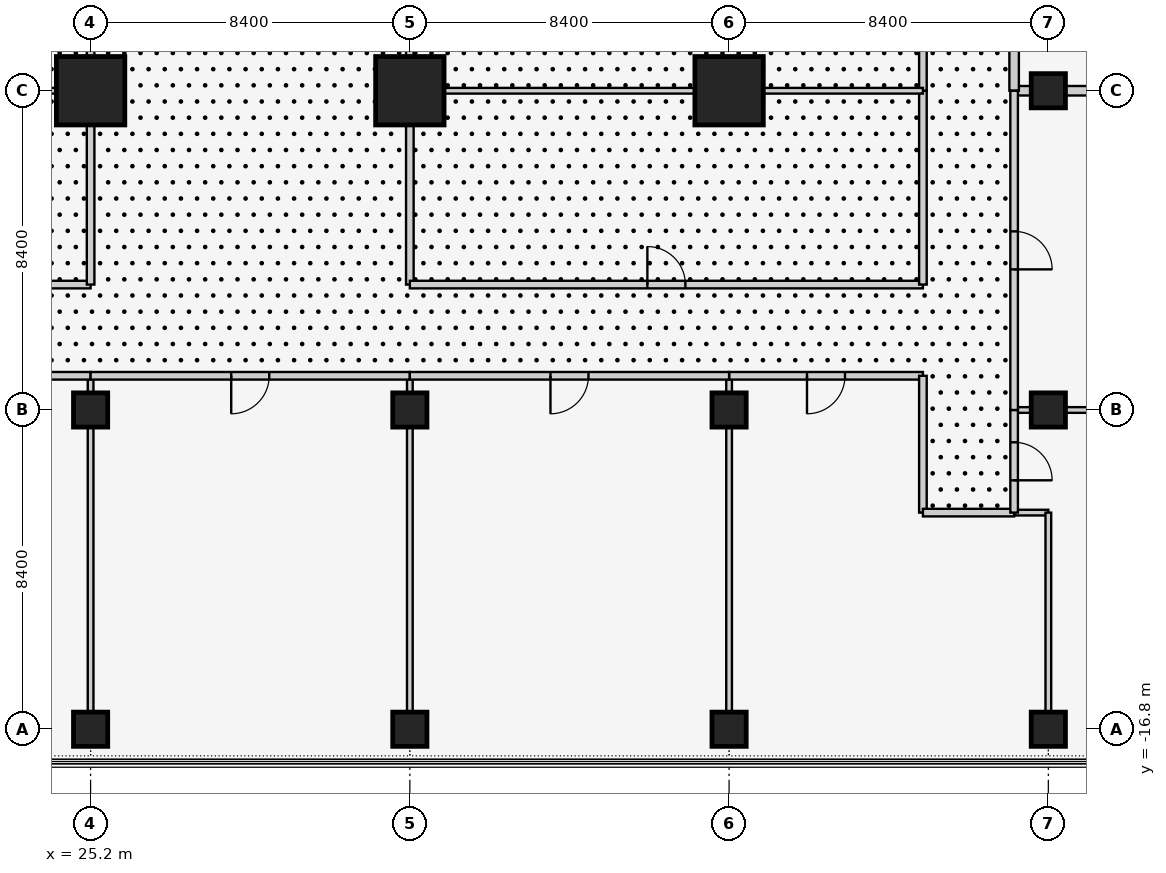
"""IFC4 building model, lengths in metres.
Left out: names, types, materials, properties, quantities, classifications, styles, units other than length and angle.
Written with IfcOpenShell. Run it as: python <this file> out.ifc"""

import sys

from ifc_helpers import new_model, si_unit, direction, frame, frame_2d, origin, origin_2d, place, context, subcontext, project, spatial, rectangle, extrude, element, fill, save


model = new_model("IFC4")
c1 = context("Model", 3, precision=1e-05, world=origin(), true_north=direction((0.0, 1.0)))
c2 = subcontext(c1, "Body", "Model", "MODEL_VIEW")
j1 = project(units=[si_unit("LENGTHUNIT", "METRE"), si_unit("PLANEANGLEUNIT", "RADIAN")], contexts=[c1])
p1 = place(None, origin())
s1 = spatial("IfcSite", under=j1, at=p1, CompositionType="ELEMENT")
p2 = place(p1, origin())
s2 = spatial("IfcBuilding", under=s1, at=p2, CompositionType="ELEMENT")
p3 = place(p2, frame((0.0, 0.0, 6.0)))
s3 = spatial("IfcBuildingStorey", under=s2, at=p3, CompositionType="ELEMENT", Elevation=6.0)
for number, where, z_axis, x_axis in (
    (1, (25.2, -16.8, 0.0), (0.0, 0.0, 1.0), (1.0, 0.0, 0.0)),
    (2, (25.2, -8.4, 0.0), (0.0, 0.0, 1.0), (1.0, 0.0, 0.0)),
):
    element("IfcColumn", number, at=place(p3, frame(where, z_axis=z_axis, x_axis=x_axis)), inside=s3, PredefinedType="COLUMN", context=c2, shape_type="SweptSolid", body=[
        extrude(rectangle(XDim=0.9, YDim=0.9, at=origin_2d()), origin(), (0.0, 0.0, 1.0), 4.5),
    ])
p4 = place(p3, frame((25.2, 0.0, 0.0), z_axis=(0.0, 0.0, 1.0), x_axis=(1.0, 0.0, 0.0)))
e3 = element("IfcColumn", 3, at=p4, inside=s3, PredefinedType="COLUMN", context=c2, shape_type="SweptSolid", body=[
    extrude(rectangle(XDim=1.8, YDim=1.8, at=origin_2d()), origin(), (0.0, 0.0, 1.0), 4.5),
])
for number, where, z_axis, x_axis in (
    (4, (33.6, -16.8, 0.0), (0.0, 0.0, 1.0), (1.0, 0.0, 0.0)),
    (5, (33.6, -8.4, 0.0), (0.0, 0.0, 1.0), (1.0, 0.0, 0.0)),
):
    element("IfcColumn", number, at=place(p3, frame(where, z_axis=z_axis, x_axis=x_axis)), inside=s3, PredefinedType="COLUMN", context=c2, shape_type="SweptSolid", body=[
        extrude(rectangle(XDim=0.9, YDim=0.9, at=origin_2d()), origin(), (0.0, 0.0, 1.0), 4.5),
    ])
p5 = place(p3, frame((33.6, 0.0, 0.0), z_axis=(0.0, 0.0, 1.0), x_axis=(1.0, 0.0, 0.0)))
e6 = element("IfcColumn", 6, at=p5, inside=s3, PredefinedType="COLUMN", context=c2, shape_type="SweptSolid", body=[
    extrude(rectangle(XDim=1.8, YDim=1.8, at=origin_2d()), origin(), (0.0, 0.0, 1.0), 4.5),
])
for number, where, z_axis, x_axis in (
    (7, (42.0, -16.8, 0.0), (0.0, 0.0, 1.0), (1.0, 0.0, 0.0)),
    (8, (42.0, -8.4, 0.0), (0.0, 0.0, 1.0), (1.0, 0.0, 0.0)),
):
    element("IfcColumn", number, at=place(p3, frame(where, z_axis=z_axis, x_axis=x_axis)), inside=s3, PredefinedType="COLUMN", context=c2, shape_type="SweptSolid", body=[
        extrude(rectangle(XDim=0.9, YDim=0.9, at=origin_2d()), origin(), (0.0, 0.0, 1.0), 4.5),
    ])
p6 = place(p3, frame((42.0, 0.0, 0.0), z_axis=(0.0, 0.0, 1.0), x_axis=(1.0, 0.0, 0.0)))
e9 = element("IfcColumn", 9, at=p6, inside=s3, PredefinedType="COLUMN", context=c2, shape_type="SweptSolid", body=[
    extrude(rectangle(XDim=1.8, YDim=1.8, at=origin_2d()), origin(), (0.0, 0.0, 1.0), 4.5),
])
for number, where, z_axis, x_axis in (
    (10, (50.4, -16.8, 0.0), (0.0, 0.0, 1.0), (1.0, 0.0, 0.0)),
    (11, (50.4, -8.4, 0.0), (0.0, 0.0, 1.0), (1.0, 0.0, 0.0)),
    (12, (50.4, 0.0, 0.0), (0.0, 0.0, 1.0), (1.0, 0.0, 0.0)),
):
    element("IfcColumn", number, at=place(p3, frame(where, z_axis=z_axis, x_axis=x_axis)), inside=s3, PredefinedType="COLUMN", context=c2, shape_type="SweptSolid", body=[
        extrude(rectangle(XDim=0.9, YDim=0.9, at=origin_2d()), origin(), (0.0, 0.0, 1.0), 4.5),
    ])
p7 = place(p3, frame((49.95, 0.0, 0.0), z_axis=(0.0, 0.0, 1.0), x_axis=(-1.0, 0.0, 0.0)))
e13 = element("IfcWall", 13, at=p7, inside=s3, PredefinedType="SOLIDWALL", context=c2, shape_type="SweptSolid", body=[
    extrude(rectangle(XDim=0.45, YDim=0.25, at=frame_2d((0.225, 0.0))), origin(), (0.0, 0.0, 1.0), 3.543),
])
p8 = place(p3, frame((58.35, 0.0, 0.0), z_axis=(0.0, 0.0, 1.0), x_axis=(-1.0, 0.0, 0.0)))
e14 = element("IfcWall", 14, at=p8, inside=s3, PredefinedType="SOLIDWALL", context=c2, shape_type="SweptSolid", body=[
    extrude(rectangle(XDim=7.5, YDim=0.25, at=frame_2d((3.75, 0.0))), origin(), (0.0, 0.0, 1.0), 3.543),
])
p9 = place(p3, frame((49.5, 0.0, 0.0), z_axis=(0.0, 0.0, 1.0), x_axis=(0.0, 1.0, 0.0)))
e15 = element("IfcWall", 15, at=p9, inside=s3, PredefinedType="SOLIDWALL", context=c2, shape_type="SweptSolid", body=[
    extrude(rectangle(XDim=8.4, YDim=0.25, at=frame_2d((4.2, 0.0))), origin(), (0.0, 0.0, 1.0), 4.3),
])
p10 = place(p9, frame((3.6, 0.0, 0.0)))
e16 = element("IfcOpeningElement", 16, at=p10, cuts=e15, PredefinedType="OPENING", context=c2, shape_type="SweptSolid", body=[
    extrude(rectangle(XDim=1.2, YDim=2.1, at=frame_2d((0.6, 1.05))), frame((0.0, 0.135, 0.0), z_axis=(0.0, -1.0, 0.0), x_axis=(1.0, 0.0, 0.0)), (0.0, 0.0, 1.0), 0.27),
])
p11 = place(p3, frame((49.5, -11.1, 0.0), z_axis=(0.0, 0.0, 1.0), x_axis=(1.0, 0.0, 0.0)))
e17 = element("IfcWall", 17, at=p11, inside=s3, PredefinedType="PARTITIONING", context=c2, shape_type="SweptSolid", body=[
    extrude(rectangle(XDim=0.9, YDim=0.15, at=frame_2d((0.45, 0.0))), origin(), (0.0, 0.0, 1.0), 4.3),
])
p12 = place(p3, frame((50.4, -11.1, 0.0), z_axis=(0.0, 0.0, 1.0), x_axis=(0.0, -1.0, 0.0)))
e18 = element("IfcWall", 18, at=p12, inside=s3, PredefinedType="PARTITIONING", context=c2, shape_type="SweptSolid", body=[
    extrude(rectangle(XDim=5.25, YDim=0.15, at=frame_2d((2.625, 0.0))), origin(), (0.0, 0.0, 1.0), 3.543),
])
p13 = place(p3, frame((42.0, -16.35, 0.0), z_axis=(0.0, 0.0, 1.0), x_axis=(0.0, 1.0, 0.0)))
e19 = element("IfcWall", 19, at=p13, inside=s3, PredefinedType="PARTITIONING", context=c2, shape_type="SweptSolid", body=[
    extrude(rectangle(XDim=7.5, YDim=0.15, at=frame_2d((3.75, 0.0))), origin(), (0.0, 0.0, 1.0), 3.543),
])
p14 = place(p3, frame((42.0, -7.95, 0.0), z_axis=(0.0, 0.0, 1.0), x_axis=(0.0, 1.0, 0.0)))
e20 = element("IfcWall", 20, at=p14, inside=s3, PredefinedType="PARTITIONING", context=c2, shape_type="SweptSolid", body=[
    extrude(rectangle(XDim=0.45, YDim=0.15, at=frame_2d((0.225, 0.0))), origin(), (0.0, 0.0, 1.0), 3.543),
])
p15 = place(p3, frame((42.0, -7.5, 0.0), z_axis=(0.0, 0.0, 1.0), x_axis=(1.0, 0.0, 0.0)))
e21 = element("IfcWall", 21, at=p15, inside=s3, PredefinedType="PARTITIONING", context=c2, shape_type="SweptSolid", body=[
    extrude(rectangle(XDim=5.1, YDim=0.2, at=frame_2d((2.55, 0.0))), origin(), (0.0, 0.0, 1.0), 4.3),
])
p16 = place(p15, frame((2.05, 0.0, 0.0)))
e22 = element("IfcOpeningElement", 22, at=p16, cuts=e21, PredefinedType="OPENING", context=c2, shape_type="SweptSolid", body=[
    extrude(rectangle(XDim=1.0, YDim=2.1, at=frame_2d((0.5, 1.05))), frame((0.0, 0.11, 0.0), z_axis=(0.0, -1.0, 0.0), x_axis=(1.0, 0.0, 0.0)), (0.0, 0.0, 1.0), 0.22),
])
p17 = place(p3, frame((47.1, -7.5, 0.0), z_axis=(0.0, 0.0, 1.0), x_axis=(0.0, -1.0, 0.0)))
e23 = element("IfcWall", 23, at=p17, inside=s3, PredefinedType="PARTITIONING", context=c2, shape_type="SweptSolid", body=[
    extrude(rectangle(XDim=3.6, YDim=0.2, at=frame_2d((1.8, 0.0))), origin(), (0.0, 0.0, 1.0), 4.3),
])
p18 = place(p3, frame((47.1, -11.1, 0.0), z_axis=(0.0, 0.0, 1.0), x_axis=(1.0, 0.0, 0.0)))
e24 = element("IfcWall", 24, at=p18, inside=s3, PredefinedType="PARTITIONING", context=c2, shape_type="SweptSolid", body=[
    extrude(rectangle(XDim=2.4, YDim=0.2, at=frame_2d((1.2, 0.0))), origin(), (0.0, 0.0, 1.0), 4.3),
])
p19 = place(p3, frame((49.5, -8.4, 0.0), z_axis=(0.0, 0.0, 1.0), x_axis=(1.0, 0.0, 0.0)))
e25 = element("IfcWall", 25, at=p19, inside=s3, PredefinedType="PARTITIONING", context=c2, shape_type="SweptSolid", body=[
    extrude(rectangle(XDim=0.45, YDim=0.15, at=frame_2d((0.225, 0.0))), origin(), (0.0, 0.0, 1.0), 3.543),
])
p20 = place(p3, frame((50.85, -8.4, 0.0), z_axis=(0.0, 0.0, 1.0), x_axis=(1.0, 0.0, 0.0)))
e26 = element("IfcWall", 26, at=p20, inside=s3, PredefinedType="PARTITIONING", context=c2, shape_type="SweptSolid", body=[
    extrude(rectangle(XDim=7.5, YDim=0.15, at=frame_2d((3.75, 0.0))), origin(), (0.0, 0.0, 1.0), 3.543),
])
p21 = place(p3, frame((49.5, -11.1, 0.0), z_axis=(0.0, 0.0, 1.0), x_axis=(0.0, 1.0, 0.0)))
e27 = element("IfcWall", 27, at=p21, inside=s3, PredefinedType="PARTITIONING", context=c2, shape_type="SweptSolid", body=[
    extrude(rectangle(XDim=2.7, YDim=0.2, at=frame_2d((1.35, 0.0))), origin(), (0.0, 0.0, 1.0), 4.3),
])
p22 = place(p21, frame((0.85, 0.0, 0.0)))
e28 = element("IfcOpeningElement", 28, at=p22, cuts=e27, PredefinedType="OPENING", context=c2, shape_type="SweptSolid", body=[
    extrude(rectangle(XDim=1.0, YDim=2.1, at=frame_2d((0.5, 1.05))), frame((0.0, 0.11, 0.0), z_axis=(0.0, -1.0, 0.0), x_axis=(1.0, 0.0, 0.0)), (0.0, 0.0, 1.0), 0.22),
])
p23 = place(p3, frame((25.2, -8.85, 0.0), z_axis=(0.0, 0.0, 1.0), x_axis=(0.0, -1.0, 0.0)))
e29 = element("IfcWall", 29, at=p23, inside=s3, PredefinedType="PARTITIONING", context=c2, shape_type="SweptSolid", body=[
    extrude(rectangle(XDim=7.5, YDim=0.15, at=frame_2d((3.75, 0.0))), origin(), (0.0, 0.0, 1.0), 3.543),
])
p24 = place(p3, frame((25.2, -7.5, 0.0), z_axis=(0.0, 0.0, 1.0), x_axis=(0.0, -1.0, 0.0)))
e30 = element("IfcWall", 30, at=p24, inside=s3, PredefinedType="PARTITIONING", context=c2, shape_type="SweptSolid", body=[
    extrude(rectangle(XDim=0.45, YDim=0.15, at=frame_2d((0.225, 0.0))), origin(), (0.0, 0.0, 1.0), 3.543),
])
p25 = place(p3, frame((16.8, -7.5, 0.0), z_axis=(0.0, 0.0, 1.0), x_axis=(1.0, 0.0, 0.0)))
e31 = element("IfcWall", 31, at=p25, inside=s3, PredefinedType="PARTITIONING", context=c2, shape_type="SweptSolid", body=[
    extrude(rectangle(XDim=8.4, YDim=0.2, at=frame_2d((4.2, 0.0))), origin(), (0.0, 0.0, 1.0), 4.3),
])
p26 = place(p25, frame((3.7, 0.0, 0.0)))
e32 = element("IfcOpeningElement", 32, at=p26, cuts=e31, PredefinedType="OPENING", context=c2, shape_type="SweptSolid", body=[
    extrude(rectangle(XDim=1.0, YDim=2.1, at=frame_2d((0.5, 1.05))), frame((0.0, 0.11, 0.0), z_axis=(0.0, -1.0, 0.0), x_axis=(1.0, 0.0, 0.0)), (0.0, 0.0, 1.0), 0.22),
])
p27 = place(p3, frame((33.6, -8.85, 0.0), z_axis=(0.0, 0.0, 1.0), x_axis=(0.0, -1.0, 0.0)))
e33 = element("IfcWall", 33, at=p27, inside=s3, PredefinedType="PARTITIONING", context=c2, shape_type="SweptSolid", body=[
    extrude(rectangle(XDim=7.5, YDim=0.15, at=frame_2d((3.75, 0.0))), origin(), (0.0, 0.0, 1.0), 3.543),
])
p28 = place(p3, frame((33.6, -7.5, 0.0), z_axis=(0.0, 0.0, 1.0), x_axis=(0.0, -1.0, 0.0)))
e34 = element("IfcWall", 34, at=p28, inside=s3, PredefinedType="PARTITIONING", context=c2, shape_type="SweptSolid", body=[
    extrude(rectangle(XDim=0.45, YDim=0.15, at=frame_2d((0.225, 0.0))), origin(), (0.0, 0.0, 1.0), 3.543),
])
p29 = place(p3, frame((25.2, -7.5, 0.0), z_axis=(0.0, 0.0, 1.0), x_axis=(1.0, 0.0, 0.0)))
e35 = element("IfcWall", 35, at=p29, inside=s3, PredefinedType="PARTITIONING", context=c2, shape_type="SweptSolid", body=[
    extrude(rectangle(XDim=8.4, YDim=0.2, at=frame_2d((4.2, 0.0))), origin(), (0.0, 0.0, 1.0), 4.3),
])
p30 = place(p29, frame((3.7, 0.0, 0.0)))
e36 = element("IfcOpeningElement", 36, at=p30, cuts=e35, PredefinedType="OPENING", context=c2, shape_type="SweptSolid", body=[
    extrude(rectangle(XDim=1.0, YDim=2.1, at=frame_2d((0.5, 1.05))), frame((0.0, 0.11, 0.0), z_axis=(0.0, -1.0, 0.0), x_axis=(1.0, 0.0, 0.0)), (0.0, 0.0, 1.0), 0.22),
])
p31 = place(p3, frame((33.6, -7.5, 0.0), z_axis=(0.0, 0.0, 1.0), x_axis=(1.0, 0.0, 0.0)))
e37 = element("IfcWall", 37, at=p31, inside=s3, PredefinedType="PARTITIONING", context=c2, shape_type="SweptSolid", body=[
    extrude(rectangle(XDim=8.4, YDim=0.2, at=frame_2d((4.2, 0.0))), origin(), (0.0, 0.0, 1.0), 4.3),
])
p32 = place(p31, frame((3.7, 0.0, 0.0)))
e38 = element("IfcOpeningElement", 38, at=p32, cuts=e37, PredefinedType="OPENING", context=c2, shape_type="SweptSolid", body=[
    extrude(rectangle(XDim=1.0, YDim=2.1, at=frame_2d((0.5, 1.05))), frame((0.0, 0.11, 0.0), z_axis=(0.0, -1.0, 0.0), x_axis=(1.0, 0.0, 0.0)), (0.0, 0.0, 1.0), 0.22),
])
p33 = place(p3, frame((49.5, -8.4, 0.0), z_axis=(0.0, 0.0, 1.0), x_axis=(0.0, 1.0, 0.0)))
e39 = element("IfcWall", 39, at=p33, inside=s3, PredefinedType="PARTITIONING", context=c2, shape_type="SweptSolid", body=[
    extrude(rectangle(XDim=8.4, YDim=0.2, at=frame_2d((4.2, 0.0))), origin(), (0.0, 0.0, 1.0), 4.3),
])
p34 = place(p33, frame((3.7, 0.0, 0.0)))
e40 = element("IfcOpeningElement", 40, at=p34, cuts=e39, PredefinedType="OPENING", context=c2, shape_type="SweptSolid", body=[
    extrude(rectangle(XDim=1.0, YDim=2.1, at=frame_2d((0.5, 1.05))), frame((0.0, 0.11, 0.0), z_axis=(0.0, -1.0, 0.0), x_axis=(1.0, 0.0, 0.0)), (0.0, 0.0, 1.0), 0.22),
])
p35 = place(p3, frame((11.7, -5.1, 0.0), z_axis=(0.0, 0.0, 1.0), x_axis=(1.0, 0.0, 0.0)))
e41 = element("IfcWall", 41, at=p35, inside=s3, PredefinedType="PARTITIONING", context=c2, shape_type="SweptSolid", body=[
    extrude(rectangle(XDim=13.5, YDim=0.2, at=frame_2d((6.75, 0.0))), origin(), (0.0, 0.0, 1.0), 4.3),
])
p36 = place(p35, frame((6.25, 0.0, 0.0)))
e42 = element("IfcOpeningElement", 42, at=p36, cuts=e41, PredefinedType="OPENING", context=c2, shape_type="SweptSolid", body=[
    extrude(rectangle(XDim=1.0, YDim=2.1, at=frame_2d((0.5, 1.05))), frame((0.0, 0.11, 0.0), z_axis=(0.0, -1.0, 0.0), x_axis=(1.0, 0.0, 0.0)), (0.0, 0.0, 1.0), 0.22),
])
for number, where, z_axis, x_axis in (
    (43, (25.2, -5.1, 0.0), (0.0, 0.0, 1.0), (0.0, 1.0, 0.0)),
    (44, (33.6, -0.9, 0.0), (0.0, 0.0, 1.0), (0.0, -1.0, 0.0)),
):
    element("IfcWall", number, at=place(p3, frame(where, z_axis=z_axis, x_axis=x_axis)), inside=s3, PredefinedType="PARTITIONING", context=c2, shape_type="SweptSolid", body=[
        extrude(rectangle(XDim=4.2, YDim=0.2, at=frame_2d((2.1, 0.0))), origin(), (0.0, 0.0, 1.0), 3.543),
    ])
p37 = place(p3, frame((33.6, -5.1, 0.0), z_axis=(0.0, 0.0, 1.0), x_axis=(1.0, 0.0, 0.0)))
e45 = element("IfcWall", 45, at=p37, inside=s3, PredefinedType="PARTITIONING", context=c2, shape_type="SweptSolid", body=[
    extrude(rectangle(XDim=13.5, YDim=0.2, at=frame_2d((6.75, 0.0))), origin(), (0.0, 0.0, 1.0), 4.3),
])
p38 = place(p37, frame((6.25, 0.0, 0.0)))
e46 = element("IfcOpeningElement", 46, at=p38, cuts=e45, PredefinedType="OPENING", context=c2, shape_type="SweptSolid", body=[
    extrude(rectangle(XDim=1.0, YDim=2.1, at=frame_2d((0.5, 1.05))), frame((0.0, 0.11, 0.0), z_axis=(0.0, -1.0, 0.0), x_axis=(1.0, 0.0, 0.0)), (0.0, 0.0, 1.0), 0.22),
])
p39 = place(p3, frame((47.1, -5.1, 0.0), z_axis=(0.0, 0.0, 1.0), x_axis=(0.0, 1.0, 0.0)))
e47 = element("IfcWall", 47, at=p39, inside=s3, PredefinedType="PARTITIONING", context=c2, shape_type="SweptSolid", body=[
    extrude(rectangle(XDim=5.1, YDim=0.2, at=frame_2d((2.55, 0.0))), origin(), (0.0, 0.0, 1.0), 4.3),
])
for number, where, z_axis, x_axis in (
    (48, (25.2, 0.9, 0.0), (0.0, 0.0, 1.0), (0.0, 1.0, 0.0)),
    (49, (33.6, 7.5, 0.0), (0.0, 0.0, 1.0), (0.0, -1.0, 0.0)),
):
    element("IfcWall", number, at=place(p3, frame(where, z_axis=z_axis, x_axis=x_axis)), inside=s3, PredefinedType="PARTITIONING", context=c2, shape_type="SweptSolid", body=[
        extrude(rectangle(XDim=6.6, YDim=0.2, at=frame_2d((3.3, 0.0))), origin(), (0.0, 0.0, 1.0), 3.543),
    ])
p40 = place(p3, frame((47.1, 0.0, 0.0), z_axis=(0.0, 0.0, 1.0), x_axis=(0.0, 1.0, 0.0)))
e50 = element("IfcWall", 50, at=p40, inside=s3, PredefinedType="PARTITIONING", context=c2, shape_type="SweptSolid", body=[
    extrude(rectangle(XDim=8.4, YDim=0.2, at=frame_2d((4.2, 0.0))), origin(), (0.0, 0.0, 1.0), 4.3),
])
p41 = place(p40, frame((3.7, 0.0, 0.0)))
e51 = element("IfcOpeningElement", 51, at=p41, cuts=e50, PredefinedType="OPENING", context=c2, shape_type="SweptSolid", body=[
    extrude(rectangle(XDim=1.0, YDim=2.1, at=frame_2d((0.5, 1.05))), frame((0.0, 0.11, 0.0), z_axis=(0.0, -1.0, 0.0), x_axis=(1.0, 0.0, 0.0)), (0.0, 0.0, 1.0), 0.22),
])
for number, where, z_axis, x_axis in (
    (52, (17.7, 0.0, 0.0), (0.0, 0.0, 1.0), (1.0, 0.0, 0.0)),
    (53, (34.5, 0.0, 0.0), (0.0, 0.0, 1.0), (1.0, 0.0, 0.0)),
):
    element("IfcWall", number, at=place(p3, frame(where, z_axis=z_axis, x_axis=x_axis)), inside=s3, PredefinedType="PARTITIONING", context=c2, shape_type="SweptSolid", body=[
        extrude(rectangle(XDim=6.6, YDim=0.15, at=frame_2d((3.3, 0.0))), origin(), (0.0, 0.0, 1.0), 3.543),
    ])
p42 = place(p3, frame((42.9, 0.0, 0.0), z_axis=(0.0, 0.0, 1.0), x_axis=(1.0, 0.0, 0.0)))
e54 = element("IfcWall", 54, at=p42, inside=s3, PredefinedType="PARTITIONING", context=c2, shape_type="SweptSolid", body=[
    extrude(rectangle(XDim=4.2, YDim=0.15, at=frame_2d((2.1, 0.0))), origin(), (0.0, 0.0, 1.0), 3.543),
])
p43 = place(p16, frame((1.0, 0.0, 0.0), z_axis=(0.0, 0.0, 1.0), x_axis=(-1.0, 0.0, 0.0)))
e55 = element("IfcDoor", 55, at=p43, inside=s3, OperationType="SINGLE_SWING_RIGHT", PredefinedType="DOOR", context=c2, shape_type="SweptSolid", body=[
    extrude(rectangle(XDim=1.0, YDim=2.1, at=frame_2d((0.5, 1.05))), frame((0.0, 0.025, 0.0), z_axis=(0.0, -1.0, 0.0), x_axis=(1.0, 0.0, 0.0)), (0.0, 0.0, 1.0), 0.05),
])
fill(e22, e55)
p44 = place(p22, frame((1.0, 0.0, 0.0), z_axis=(0.0, 0.0, 1.0), x_axis=(-1.0, 0.0, 0.0)))
e56 = element("IfcDoor", 56, at=p44, inside=s3, OperationType="SINGLE_SWING_RIGHT", PredefinedType="DOOR", context=c2, shape_type="SweptSolid", body=[
    extrude(rectangle(XDim=1.0, YDim=2.1, at=frame_2d((0.5, 1.05))), frame((0.0, 0.025, 0.0), z_axis=(0.0, -1.0, 0.0), x_axis=(1.0, 0.0, 0.0)), (0.0, 0.0, 1.0), 0.05),
])
fill(e28, e56)
p45 = place(p30, frame((1.0, 0.0, 0.0), z_axis=(0.0, 0.0, 1.0), x_axis=(-1.0, 0.0, 0.0)))
e57 = element("IfcDoor", 57, at=p45, inside=s3, OperationType="SINGLE_SWING_RIGHT", PredefinedType="DOOR", context=c2, shape_type="SweptSolid", body=[
    extrude(rectangle(XDim=1.0, YDim=2.1, at=frame_2d((0.5, 1.05))), frame((0.0, 0.025, 0.0), z_axis=(0.0, -1.0, 0.0), x_axis=(1.0, 0.0, 0.0)), (0.0, 0.0, 1.0), 0.05),
])
fill(e36, e57)
p46 = place(p32, frame((1.0, 0.0, 0.0), z_axis=(0.0, 0.0, 1.0), x_axis=(-1.0, 0.0, 0.0)))
e58 = element("IfcDoor", 58, at=p46, inside=s3, OperationType="SINGLE_SWING_RIGHT", PredefinedType="DOOR", context=c2, shape_type="SweptSolid", body=[
    extrude(rectangle(XDim=1.0, YDim=2.1, at=frame_2d((0.5, 1.05))), frame((0.0, 0.025, 0.0), z_axis=(0.0, -1.0, 0.0), x_axis=(1.0, 0.0, 0.0)), (0.0, 0.0, 1.0), 0.05),
])
fill(e38, e58)
p47 = place(p34, frame((1.0, 0.0, 0.0), z_axis=(0.0, 0.0, 1.0), x_axis=(-1.0, 0.0, 0.0)))
e59 = element("IfcDoor", 59, at=p47, inside=s3, OperationType="SINGLE_SWING_RIGHT", PredefinedType="DOOR", context=c2, shape_type="SweptSolid", body=[
    extrude(rectangle(XDim=1.0, YDim=2.1, at=frame_2d((0.5, 1.05))), frame((0.0, 0.025, 0.0), z_axis=(0.0, -1.0, 0.0), x_axis=(1.0, 0.0, 0.0)), (0.0, 0.0, 1.0), 0.05),
])
fill(e40, e59)
p48 = place(p38, origin())
e60 = element("IfcDoor", 60, at=p48, inside=s3, OperationType="SINGLE_SWING_LEFT", PredefinedType="DOOR", context=c2, shape_type="SweptSolid", body=[
    extrude(rectangle(XDim=1.0, YDim=2.1, at=frame_2d((0.5, 1.05))), frame((0.0, 0.025, 0.0), z_axis=(0.0, -1.0, 0.0), x_axis=(1.0, 0.0, 0.0)), (0.0, 0.0, 1.0), 0.05),
])
fill(e46, e60)
save(model, sys.argv[1])
